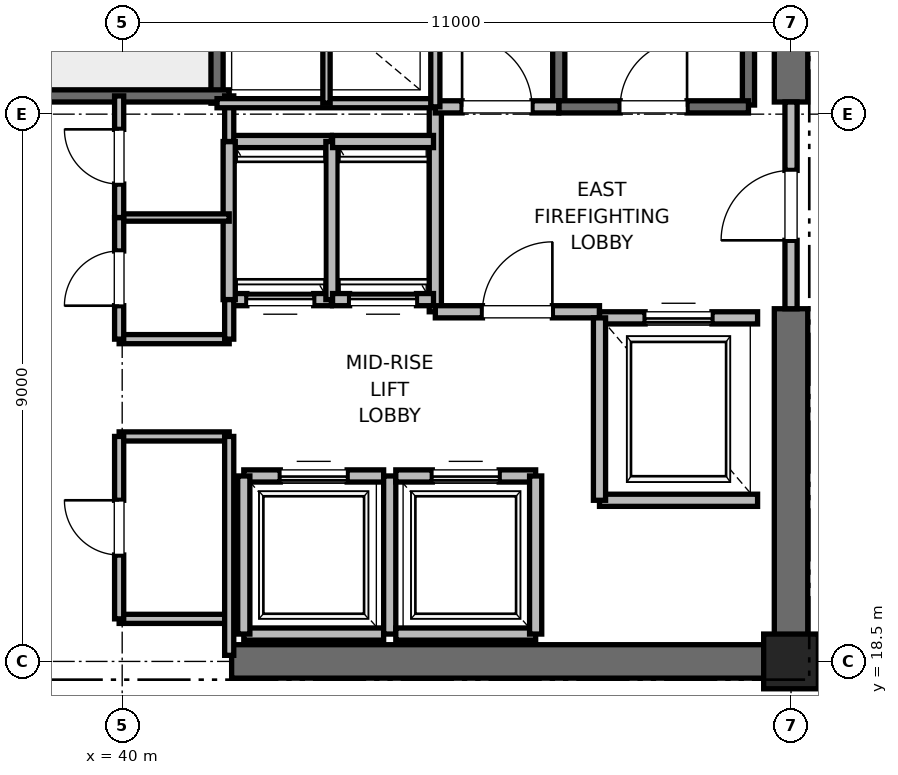
"""IFC4 building model, lengths in metres.
Left out: names, types, materials, properties, quantities, classifications, styles, units other than length and angle.
Written with IfcOpenShell. Run it as: python <this file> out.ifc"""

import sys

from ifc_helpers import new_model, si_unit, direction, frame, frame_2d, origin, origin_2d, place, context, subcontext, project, spatial, rectangle, extrude, element, fill, save


model = new_model("IFC4")
c1 = context("Model", 3, precision=1e-05, world=origin(), true_north=direction((0.0, 1.0)))
c2 = subcontext(c1, "Body", "Model", "MODEL_VIEW")
j1 = project(units=[si_unit("LENGTHUNIT", "METRE"), si_unit("PLANEANGLEUNIT", "RADIAN")], contexts=[c1])
p1 = place(None, origin())
s1 = spatial("IfcSite", under=j1, at=p1, CompositionType="ELEMENT")
p2 = place(p1, origin())
s2 = spatial("IfcBuilding", under=s1, at=p2, CompositionType="ELEMENT")
p3 = place(p2, frame((0.0, 0.0, 229.2)))
s3 = spatial("IfcBuildingStorey", under=s2, at=p3, CompositionType="ELEMENT", Elevation=229.2)
p4 = place(p3, frame((51.0, 18.5, 0.0), z_axis=(0.0, 0.0, 1.0), x_axis=(1.0, 0.0, 0.0)))
e1 = element("IfcColumn", 1, at=p4, inside=s3, PredefinedType="PILASTER", context=c2, shape_type="SweptSolid", body=[
    extrude(rectangle(XDim=0.9, YDim=0.9, at=origin_2d()), origin(), (0.0, 0.0, 1.0), 4.0),
])
p5 = place(p3, frame((41.8, 18.5, 0.0), z_axis=(0.0, 0.0, 1.0), x_axis=(1.0, 0.0, 0.0)))
e2 = element("IfcWall", 2, at=p5, inside=s3, PredefinedType="SHEAR", context=c2, shape_type="SweptSolid", body=[
    extrude(rectangle(XDim=9.2, YDim=0.55, at=frame_2d((4.6, 0.0))), origin(), (0.0, 0.0, 1.0), 3.7),
])
p6 = place(p3, frame((51.0, 18.5, 0.0), z_axis=(0.0, 0.0, 1.0), x_axis=(0.0, 1.0, 0.0)))
e3 = element("IfcWall", 3, at=p6, inside=s3, PredefinedType="SHEAR", context=c2, shape_type="SweptSolid", body=[
    extrude(rectangle(XDim=5.8, YDim=0.55, at=frame_2d((2.9, 0.0))), origin(), (0.0, 0.0, 1.0), 3.7),
])
p7 = place(p3, frame((51.0, 27.7, 0.0), z_axis=(0.0, 0.0, 1.0), x_axis=(0.0, 1.0, 0.0)))
e4 = element("IfcWall", 4, at=p7, inside=s3, PredefinedType="SHEAR", context=c2, shape_type="SweptSolid", body=[
    extrude(rectangle(XDim=8.8, YDim=0.55, at=frame_2d((4.4, 0.0))), origin(), (0.0, 0.0, 1.0), 3.7),
])
p8 = place(p3, frame((50.3, 27.65, 0.0), z_axis=(0.0, 0.0, 1.0), x_axis=(0.0, 1.0, 0.0)))
e5 = element("IfcWall", 5, at=p8, inside=s3, PredefinedType="SOLIDWALL", context=c2, shape_type="SweptSolid", body=[
    extrude(rectangle(XDim=8.15, YDim=0.2, at=frame_2d((4.075, 0.0))), origin(), (0.0, 0.0, 1.0), 3.7),
])
p9 = place(p3, frame((47.18, 27.62, 0.0), z_axis=(0.0, 0.0, 1.0), x_axis=(0.0, 1.0, 0.0)))
e6 = element("IfcWall", 6, at=p9, inside=s3, PredefinedType="SOLIDWALL", context=c2, shape_type="SweptSolid", body=[
    extrude(rectangle(XDim=8.18, YDim=0.2, at=frame_2d((4.09, 0.0))), origin(), (0.0, 0.0, 1.0), 3.7),
])
p10 = place(p3, frame((47.18, 27.62, 0.0), z_axis=(0.0, 0.0, 1.0), x_axis=(1.0, 0.0, 0.0)))
e7 = element("IfcWall", 7, at=p10, inside=s3, PredefinedType="SOLIDWALL", context=c2, shape_type="SweptSolid", body=[
    extrude(rectangle(XDim=3.12, YDim=0.2, at=frame_2d((1.56, 0.0))), origin(), (0.0, 0.0, 1.0), 3.7),
])
p11 = place(p10, frame((1.01, 0.0, 0.0)))
e8 = element("IfcOpeningElement", 8, at=p11, cuts=e7, PredefinedType="OPENING", context=c2, shape_type="SweptSolid", body=[
    extrude(rectangle(XDim=1.1, YDim=2.15, at=frame_2d((0.55, 1.075))), frame((0.0, 0.1, 0.0), z_axis=(0.0, -1.0, 0.0), x_axis=(1.0, 0.0, 0.0)), (0.0, 0.0, 1.0), 0.2),
])
p12 = place(p3, frame((41.56, 27.68, 0.0), z_axis=(0.0, 0.0, 1.0), x_axis=(0.0, 1.0, 0.0)))
e9 = element("IfcWall", 9, at=p12, inside=s3, PredefinedType="SOLIDWALL", context=c2, shape_type="SweptSolid", body=[
    extrude(rectangle(XDim=8.57, YDim=0.2, at=frame_2d((4.285, 0.0))), origin(), (0.0, 0.0, 1.0), 3.7),
])
p13 = place(p3, frame((38.44, 27.8, 0.0), z_axis=(0.0, 0.0, 1.0), x_axis=(1.0, 0.0, 0.0)))
e10 = element("IfcWall", 10, at=p13, inside=s3, PredefinedType="SOLIDWALL", context=c2, shape_type="SweptSolid", body=[
    extrude(rectangle(XDim=3.32, YDim=0.2, at=frame_2d((1.66, 0.0))), origin(), (0.0, 0.0, 1.0), 3.7),
])
p14 = place(p3, frame((45.15, 24.25, 0.0), z_axis=(0.0, 0.0, 1.0), x_axis=(0.0, 1.0, 0.0)))
e11 = element("IfcWall", 11, at=p14, inside=s3, PredefinedType="PARTITIONING", context=c2, shape_type="SweptSolid", body=[
    extrude(rectangle(XDim=3.37, YDim=0.2, at=frame_2d((1.685, 0.0))), origin(), (0.0, 0.0, 1.0), 3.7),
])
p15 = place(p3, frame((45.15, 24.25, 0.0), z_axis=(0.0, 0.0, 1.0), x_axis=(1.0, 0.0, 0.0)))
e12 = element("IfcWall", 12, at=p15, inside=s3, PredefinedType="PARTITIONING", context=c2, shape_type="SweptSolid", body=[
    extrude(rectangle(XDim=2.7, YDim=0.2, at=frame_2d((1.35, 0.0))), origin(), (0.0, 0.0, 1.0), 3.7),
])
p16 = place(p15, frame((0.775, 0.0, 0.0)))
e13 = element("IfcOpeningElement", 13, at=p16, cuts=e12, PredefinedType="OPENING", context=c2, shape_type="SweptSolid", body=[
    extrude(rectangle(XDim=1.15, YDim=2.2, at=frame_2d((0.575, 1.1))), frame((0.0, 0.1, 0.0), z_axis=(0.0, -1.0, 0.0), x_axis=(1.0, 0.0, 0.0)), (0.0, 0.0, 1.0), 0.2),
])
p17 = place(p3, frame((45.15, 27.62, 0.0), z_axis=(0.0, 0.0, 1.0), x_axis=(1.0, 0.0, 0.0)))
e14 = element("IfcWall", 14, at=p17, inside=s3, PredefinedType="PARTITIONING", context=c2, shape_type="SweptSolid", body=[
    extrude(rectangle(XDim=2.03, YDim=0.2, at=frame_2d((1.015, 0.0))), origin(), (0.0, 0.0, 1.0), 3.7),
])
p18 = place(p17, frame((0.44, 0.0, 0.0)))
e15 = element("IfcOpeningElement", 15, at=p18, cuts=e14, PredefinedType="OPENING", context=c2, shape_type="SweptSolid", body=[
    extrude(rectangle(XDim=1.15, YDim=2.2, at=frame_2d((0.575, 1.1))), frame((0.0, 0.1, 0.0), z_axis=(0.0, -1.0, 0.0), x_axis=(1.0, 0.0, 0.0)), (0.0, 0.0, 1.0), 0.2),
])
p19 = place(p3, frame((51.0, 24.3, 0.0), z_axis=(0.0, 0.0, 1.0), x_axis=(0.0, 1.0, 0.0)))
e16 = element("IfcWall", 16, at=p19, inside=s3, PredefinedType="PARTITIONING", context=c2, shape_type="SweptSolid", body=[
    extrude(rectangle(XDim=3.4, YDim=0.2, at=frame_2d((1.7, 0.0))), origin(), (0.0, 0.0, 1.0), 2.68),
])
p20 = place(p19, frame((1.125, 0.0, 0.0)))
e17 = element("IfcOpeningElement", 17, at=p20, cuts=e16, PredefinedType="OPENING", context=c2, shape_type="SweptSolid", body=[
    extrude(rectangle(XDim=1.15, YDim=2.2, at=frame_2d((0.575, 1.1))), frame((0.0, 0.1, 0.0), z_axis=(0.0, -1.0, 0.0), x_axis=(1.0, 0.0, 0.0)), (0.0, 0.0, 1.0), 0.2),
])
p21 = place(p3, frame((47.85, 21.15, 0.0), z_axis=(0.0, 0.0, 1.0), x_axis=(1.0, 0.0, 0.0)))
e18 = element("IfcWall", 18, at=p21, inside=s3, PredefinedType="SOLIDWALL", context=c2, shape_type="SweptSolid", body=[
    extrude(rectangle(XDim=2.6, YDim=0.2, at=frame_2d((1.3, 0.0))), origin(), (0.0, 0.0, 1.0), 3.7),
])
p22 = place(p3, frame((50.45, 24.15, 0.0), z_axis=(0.0, 0.0, 1.0), x_axis=(-1.0, 0.0, 0.0)))
e19 = element("IfcWall", 19, at=p22, inside=s3, PredefinedType="SOLIDWALL", context=c2, shape_type="SweptSolid", body=[
    extrude(rectangle(XDim=2.6, YDim=0.2, at=frame_2d((1.3, 0.0))), origin(), (0.0, 0.0, 1.0), 2.68),
])
p23 = place(p22, frame((0.75, 0.0, 0.0)))
e20 = element("IfcOpeningElement", 20, at=p23, cuts=e19, PredefinedType="OPENING", context=c2, shape_type="SweptSolid", body=[
    extrude(rectangle(XDim=1.1, YDim=2.2, at=frame_2d((0.55, 1.1))), frame((0.0, 0.1, 0.0), z_axis=(0.0, -1.0, 0.0), x_axis=(1.0, 0.0, 0.0)), (0.0, 0.0, 1.0), 0.2),
])
p24 = place(p3, frame((47.85, 24.15, 0.0), z_axis=(0.0, 0.0, 1.0), x_axis=(0.0, -1.0, 0.0)))
e21 = element("IfcWall", 21, at=p24, inside=s3, PredefinedType="SOLIDWALL", context=c2, shape_type="SweptSolid", body=[
    extrude(rectangle(XDim=3.0, YDim=0.2, at=frame_2d((1.5, 0.0))), origin(), (0.0, 0.0, 1.0), 3.7),
])
p25 = place(p3, frame((42.0, 18.95, 0.0), z_axis=(0.0, 0.0, 1.0), x_axis=(1.0, 0.0, 0.0)))
e22 = element("IfcWall", 22, at=p25, inside=s3, PredefinedType="SOLIDWALL", context=c2, shape_type="SweptSolid", body=[
    extrude(rectangle(XDim=2.3, YDim=0.2, at=frame_2d((1.15, 0.0))), origin(), (0.0, 0.0, 1.0), 2.68),
])
p26 = place(p3, frame((44.3, 21.55, 0.0), z_axis=(0.0, 0.0, 1.0), x_axis=(-1.0, 0.0, 0.0)))
e23 = element("IfcWall", 23, at=p26, inside=s3, PredefinedType="SOLIDWALL", context=c2, shape_type="SweptSolid", body=[
    extrude(rectangle(XDim=2.3, YDim=0.2, at=frame_2d((1.15, 0.0))), origin(), (0.0, 0.0, 1.0), 3.7),
])
p27 = place(p26, frame((0.6, 0.0, 0.0)))
e24 = element("IfcOpeningElement", 24, at=p27, cuts=e23, PredefinedType="OPENING", context=c2, shape_type="SweptSolid", body=[
    extrude(rectangle(XDim=1.1, YDim=2.2, at=frame_2d((0.55, 1.1))), frame((0.0, 0.1, 0.0), z_axis=(0.0, -1.0, 0.0), x_axis=(1.0, 0.0, 0.0)), (0.0, 0.0, 1.0), 0.2),
])
p28 = place(p3, frame((42.0, 21.55, 0.0), z_axis=(0.0, 0.0, 1.0), x_axis=(0.0, -1.0, 0.0)))
e25 = element("IfcWall", 25, at=p28, inside=s3, PredefinedType="SOLIDWALL", context=c2, shape_type="SweptSolid", body=[
    extrude(rectangle(XDim=2.6, YDim=0.2, at=frame_2d((1.3, 0.0))), origin(), (0.0, 0.0, 1.0), 2.68),
])
p29 = place(p3, frame((44.4, 18.95, 0.0), z_axis=(0.0, 0.0, 1.0), x_axis=(0.0, 1.0, 0.0)))
e26 = element("IfcWall", 26, at=p29, inside=s3, PredefinedType="SOLIDWALL", context=c2, shape_type="SweptSolid", body=[
    extrude(rectangle(XDim=2.6, YDim=0.2, at=frame_2d((1.3, 0.0))), origin(), (0.0, 0.0, 1.0), 3.7),
])
p30 = place(p3, frame((44.5, 18.95, 0.0), z_axis=(0.0, 0.0, 1.0), x_axis=(1.0, 0.0, 0.0)))
e27 = element("IfcWall", 27, at=p30, inside=s3, PredefinedType="SOLIDWALL", context=c2, shape_type="SweptSolid", body=[
    extrude(rectangle(XDim=2.3, YDim=0.2, at=frame_2d((1.15, 0.0))), origin(), (0.0, 0.0, 1.0), 3.7),
])
p31 = place(p3, frame((46.8, 21.55, 0.0), z_axis=(0.0, 0.0, 1.0), x_axis=(-1.0, 0.0, 0.0)))
e28 = element("IfcWall", 28, at=p31, inside=s3, PredefinedType="SOLIDWALL", context=c2, shape_type="SweptSolid", body=[
    extrude(rectangle(XDim=2.3, YDim=0.2, at=frame_2d((1.15, 0.0))), origin(), (0.0, 0.0, 1.0), 3.7),
])
p32 = place(p31, frame((0.6, 0.0, 0.0)))
e29 = element("IfcOpeningElement", 29, at=p32, cuts=e28, PredefinedType="OPENING", context=c2, shape_type="SweptSolid", body=[
    extrude(rectangle(XDim=1.1, YDim=2.2, at=frame_2d((0.55, 1.1))), frame((0.0, 0.1, 0.0), z_axis=(0.0, -1.0, 0.0), x_axis=(1.0, 0.0, 0.0)), (0.0, 0.0, 1.0), 0.2),
])
p33 = place(p3, frame((46.8, 18.95, 0.0), z_axis=(0.0, 0.0, 1.0), x_axis=(0.0, 1.0, 0.0)))
e30 = element("IfcWall", 30, at=p33, inside=s3, PredefinedType="SOLIDWALL", context=c2, shape_type="SweptSolid", body=[
    extrude(rectangle(XDim=2.6, YDim=0.2, at=frame_2d((1.3, 0.0))), origin(), (0.0, 0.0, 1.0), 3.7),
])
p34 = place(p3, frame((41.76, 24.45, 0.0), z_axis=(0.0, 0.0, 1.0), x_axis=(1.0, 0.0, 0.0)))
e31 = element("IfcWall", 31, at=p34, inside=s3, PredefinedType="SOLIDWALL", context=c2, shape_type="SweptSolid", body=[
    extrude(rectangle(XDim=1.68, YDim=0.2, at=frame_2d((0.84, 0.0))), origin(), (0.0, 0.0, 1.0), 3.7),
])
p35 = place(p34, frame((0.29, 0.0, 0.0)))
e32 = element("IfcOpeningElement", 32, at=p35, cuts=e31, PredefinedType="OPENING", context=c2, shape_type="SweptSolid", body=[
    extrude(rectangle(XDim=1.1, YDim=2.2, at=frame_2d((0.55, 1.1))), frame((0.0, 0.1, 0.0), z_axis=(0.0, -1.0, 0.0), x_axis=(1.0, 0.0, 0.0)), (0.0, 0.0, 1.0), 0.2),
])
p36 = place(p3, frame((43.44, 27.05, 0.0), z_axis=(0.0, 0.0, 1.0), x_axis=(-1.0, 0.0, 0.0)))
e33 = element("IfcWall", 33, at=p36, inside=s3, PredefinedType="SOLIDWALL", context=c2, shape_type="SweptSolid", body=[
    extrude(rectangle(XDim=1.68, YDim=0.2, at=frame_2d((0.84, 0.0))), origin(), (0.0, 0.0, 1.0), 3.7),
])
for number, where, z_axis, x_axis in (
    (34, (41.76, 27.05, 0.0), (0.0, 0.0, 1.0), (0.0, -1.0, 0.0)),
    (35, (43.45, 24.45, 0.0), (0.0, 0.0, 1.0), (0.0, 1.0, 0.0)),
):
    element("IfcWall", number, at=place(p3, frame(where, z_axis=z_axis, x_axis=x_axis)), inside=s3, PredefinedType="SOLIDWALL", context=c2, shape_type="SweptSolid", body=[
        extrude(rectangle(XDim=2.6, YDim=0.2, at=frame_2d((1.3, 0.0))), origin(), (0.0, 0.0, 1.0), 3.7),
    ])
p37 = place(p3, frame((43.46, 24.45, 0.0), z_axis=(0.0, 0.0, 1.0), x_axis=(1.0, 0.0, 0.0)))
e36 = element("IfcWall", 36, at=p37, inside=s3, PredefinedType="SOLIDWALL", context=c2, shape_type="SweptSolid", body=[
    extrude(rectangle(XDim=1.66, YDim=0.2, at=frame_2d((0.83, 0.0))), origin(), (0.0, 0.0, 1.0), 3.7),
])
p38 = place(p37, frame((0.28, 0.0, 0.0)))
e37 = element("IfcOpeningElement", 37, at=p38, cuts=e36, PredefinedType="OPENING", context=c2, shape_type="SweptSolid", body=[
    extrude(rectangle(XDim=1.1, YDim=2.2, at=frame_2d((0.55, 1.1))), frame((0.0, 0.1, 0.0), z_axis=(0.0, -1.0, 0.0), x_axis=(1.0, 0.0, 0.0)), (0.0, 0.0, 1.0), 0.2),
])
p39 = place(p3, frame((45.12, 27.05, 0.0), z_axis=(0.0, 0.0, 1.0), x_axis=(-1.0, 0.0, 0.0)))
e38 = element("IfcWall", 38, at=p39, inside=s3, PredefinedType="SOLIDWALL", context=c2, shape_type="SweptSolid", body=[
    extrude(rectangle(XDim=1.66, YDim=0.2, at=frame_2d((0.83, 0.0))), origin(), (0.0, 0.0, 1.0), 3.7),
])
for number, where, z_axis, x_axis in (
    (39, (39.95, 19.2, 0.0), (0.0, 0.0, 1.0), (1.0, 0.0, 0.0)),
    (40, (39.95, 22.2, 0.0), (0.0, 0.0, 1.0), (1.0, 0.0, 0.0)),
    (41, (39.95, 23.8, 0.0), (0.0, 0.0, 1.0), (1.0, 0.0, 0.0)),
):
    element("IfcWall", number, at=place(p3, frame(where, z_axis=z_axis, x_axis=x_axis)), inside=s3, PredefinedType="PARTITIONING", context=c2, shape_type="SweptSolid", body=[
        extrude(rectangle(XDim=1.81, YDim=0.15, at=frame_2d((0.905, 0.0))), origin(), (0.0, 0.0, 1.0), 2.85),
    ])
p40 = place(p3, frame((39.95, 25.8, 0.0), z_axis=(0.0, 0.0, 1.0), x_axis=(1.0, 0.0, 0.0)))
e42 = element("IfcWall", 42, at=p40, inside=s3, PredefinedType="PARTITIONING", context=c2, shape_type="SweptSolid", body=[
    extrude(rectangle(XDim=1.81, YDim=0.12, at=frame_2d((0.905, 0.0))), origin(), (0.0, 0.0, 1.0), 2.85),
])
p41 = place(p3, frame((41.76, 18.6, 0.0), z_axis=(0.0, 0.0, 1.0), x_axis=(0.0, 1.0, 0.0)))
e43 = element("IfcWall", 43, at=p41, inside=s3, PredefinedType="PARTITIONING", context=c2, shape_type="SweptSolid", body=[
    extrude(rectangle(XDim=3.6, YDim=0.15, at=frame_2d((1.8, 0.0))), origin(), (0.0, 0.0, 1.0), 2.68),
])
p42 = place(p3, frame((41.76, 23.8, 0.0), z_axis=(0.0, 0.0, 1.0), x_axis=(0.0, 1.0, 0.0)))
e44 = element("IfcWall", 44, at=p42, inside=s3, PredefinedType="PARTITIONING", context=c2, shape_type="SweptSolid", body=[
    extrude(rectangle(XDim=0.65, YDim=0.15, at=frame_2d((0.325, 0.0))), origin(), (0.0, 0.0, 1.0), 2.85),
])
p43 = place(p3, frame((41.76, 27.05, 0.0), z_axis=(0.0, 0.0, 1.0), x_axis=(0.0, 1.0, 0.0)))
e45 = element("IfcWall", 45, at=p43, inside=s3, PredefinedType="PARTITIONING", context=c2, shape_type="SweptSolid", body=[
    extrude(rectangle(XDim=0.75, YDim=0.15, at=frame_2d((0.375, 0.0))), origin(), (0.0, 0.0, 1.0), 2.85),
])
p44 = place(p3, frame((39.95, 19.2, 0.0), z_axis=(0.0, 0.0, 1.0), x_axis=(0.0, 1.0, 0.0)))
e46 = element("IfcWall", 46, at=p44, inside=s3, PredefinedType="PARTITIONING", context=c2, shape_type="SweptSolid", body=[
    extrude(rectangle(XDim=3.0, YDim=0.15, at=frame_2d((1.5, 0.0))), origin(), (0.0, 0.0, 1.0), 2.85),
])
p45 = place(p44, frame((1.05, 0.0, 0.0)))
e47 = element("IfcOpeningElement", 47, at=p45, cuts=e46, PredefinedType="OPENING", context=c2, shape_type="SweptSolid", body=[
    extrude(rectangle(XDim=0.9, YDim=2.1, at=frame_2d((0.45, 1.05))), frame((0.0, 0.075, 0.0), z_axis=(0.0, -1.0, 0.0), x_axis=(1.0, 0.0, 0.0)), (0.0, 0.0, 1.0), 0.15),
])
p46 = place(p3, frame((39.95, 23.8, 0.0), z_axis=(0.0, 0.0, 1.0), x_axis=(0.0, 1.0, 0.0)))
e48 = element("IfcWall", 48, at=p46, inside=s3, PredefinedType="PARTITIONING", context=c2, shape_type="SweptSolid", body=[
    extrude(rectangle(XDim=2.0, YDim=0.15, at=frame_2d((1.0, 0.0))), origin(), (0.0, 0.0, 1.0), 2.85),
])
p47 = place(p46, frame((0.55, 0.0, 0.0)))
e49 = element("IfcOpeningElement", 49, at=p47, cuts=e48, PredefinedType="OPENING", context=c2, shape_type="SweptSolid", body=[
    extrude(rectangle(XDim=0.9, YDim=2.1, at=frame_2d((0.45, 1.05))), frame((0.0, 0.075, 0.0), z_axis=(0.0, -1.0, 0.0), x_axis=(1.0, 0.0, 0.0)), (0.0, 0.0, 1.0), 0.15),
])
p48 = place(p3, frame((39.95, 25.8, 0.0), z_axis=(0.0, 0.0, 1.0), x_axis=(0.0, 1.0, 0.0)))
e50 = element("IfcWall", 50, at=p48, inside=s3, PredefinedType="PARTITIONING", context=c2, shape_type="SweptSolid", body=[
    extrude(rectangle(XDim=2.0, YDim=0.15, at=frame_2d((1.0, 0.0))), origin(), (0.0, 0.0, 1.0), 2.85),
])
p49 = place(p48, frame((0.55, 0.0, 0.0)))
e51 = element("IfcOpeningElement", 51, at=p49, cuts=e50, PredefinedType="OPENING", context=c2, shape_type="SweptSolid", body=[
    extrude(rectangle(XDim=0.9, YDim=2.1, at=frame_2d((0.45, 1.05))), frame((0.0, 0.075, 0.0), z_axis=(0.0, -1.0, 0.0), x_axis=(1.0, 0.0, 0.0)), (0.0, 0.0, 1.0), 0.15),
])
p50 = place(p3, frame((41.56, 27.68, 0.0), z_axis=(0.0, 0.0, 1.0), x_axis=(1.0, 0.0, 0.0)))
e52 = element("IfcWall", 52, at=p50, inside=s3, PredefinedType="PARTITIONING", context=c2, shape_type="SweptSolid", body=[
    extrude(rectangle(XDim=3.59, YDim=0.15, at=frame_2d((1.795, 0.0))), origin(), (0.0, 0.0, 1.0), 2.85),
])
p51 = place(p3, frame((45.15, 27.62, 0.0), z_axis=(0.0, 0.0, 1.0), x_axis=(0.0, 1.0, 0.0)))
e53 = element("IfcWall", 53, at=p51, inside=s3, PredefinedType="PARTITIONING", context=c2, shape_type="SweptSolid", body=[
    extrude(rectangle(XDim=3.1, YDim=0.15, at=frame_2d((1.55, 0.0))), origin(), (0.0, 0.0, 1.0), 2.85),
])
p52 = place(p3, frame((43.36, 27.68, 0.0), z_axis=(0.0, 0.0, 1.0), x_axis=(0.0, 1.0, 0.0)))
e54 = element("IfcWall", 54, at=p52, inside=s3, PredefinedType="PARTITIONING", context=c2, shape_type="SweptSolid", body=[
    extrude(rectangle(XDim=3.04, YDim=0.12, at=frame_2d((1.52, 0.0))), origin(), (0.0, 0.0, 1.0), 2.85),
])
p53 = place(p11, origin())
e55 = element("IfcDoor", 55, at=p53, inside=s3, OperationType="SINGLE_SWING_RIGHT", PredefinedType="DOOR", context=c2, shape_type="SweptSolid", body=[
    extrude(rectangle(XDim=1.1, YDim=2.15, at=frame_2d((0.55, 1.075))), frame((0.0, 0.025, 0.0), z_axis=(0.0, -1.0, 0.0), x_axis=(1.0, 0.0, 0.0)), (0.0, 0.0, 1.0), 0.05),
])
fill(e8, e55)
p54 = place(p16, origin())
e56 = element("IfcDoor", 56, at=p54, inside=s3, OperationType="SINGLE_SWING_RIGHT", PredefinedType="DOOR", context=c2, shape_type="SweptSolid", body=[
    extrude(rectangle(XDim=1.15, YDim=2.2, at=frame_2d((0.575, 1.1))), frame((0.0, 0.025, 0.0), z_axis=(0.0, -1.0, 0.0), x_axis=(1.0, 0.0, 0.0)), (0.0, 0.0, 1.0), 0.05),
])
fill(e13, e56)
p55 = place(p18, origin())
e57 = element("IfcDoor", 57, at=p55, inside=s3, OperationType="SINGLE_SWING_LEFT", PredefinedType="DOOR", context=c2, shape_type="SweptSolid", body=[
    extrude(rectangle(XDim=1.15, YDim=2.2, at=frame_2d((0.575, 1.1))), frame((0.0, 0.025, 0.0), z_axis=(0.0, -1.0, 0.0), x_axis=(1.0, 0.0, 0.0)), (0.0, 0.0, 1.0), 0.05),
])
fill(e15, e57)
p56 = place(p20, origin())
e58 = element("IfcDoor", 58, at=p56, inside=s3, OperationType="SINGLE_SWING_LEFT", PredefinedType="DOOR", context=c2, shape_type="SweptSolid", body=[
    extrude(rectangle(XDim=1.15, YDim=2.2, at=frame_2d((0.575, 1.1))), frame((0.0, 0.025, 0.0), z_axis=(0.0, -1.0, 0.0), x_axis=(1.0, 0.0, 0.0)), (0.0, 0.0, 1.0), 0.05),
])
fill(e17, e58)
p57 = place(p23, origin())
e59 = element("IfcDoor", 59, at=p57, inside=s3, OperationType="SLIDING_TO_RIGHT", PredefinedType="DOOR", context=c2, shape_type="SweptSolid", body=[
    extrude(rectangle(XDim=1.1, YDim=2.2, at=frame_2d((0.55, 1.1))), frame((0.0, 0.025, 0.0), z_axis=(0.0, -1.0, 0.0), x_axis=(1.0, 0.0, 0.0)), (0.0, 0.0, 1.0), 0.05),
])
fill(e20, e59)
p58 = place(p27, origin())
e60 = element("IfcDoor", 60, at=p58, inside=s3, OperationType="SLIDING_TO_RIGHT", PredefinedType="DOOR", context=c2, shape_type="SweptSolid", body=[
    extrude(rectangle(XDim=1.1, YDim=2.2, at=frame_2d((0.55, 1.1))), frame((0.0, 0.025, 0.0), z_axis=(0.0, -1.0, 0.0), x_axis=(1.0, 0.0, 0.0)), (0.0, 0.0, 1.0), 0.05),
])
fill(e24, e60)
p59 = place(p32, origin())
e61 = element("IfcDoor", 61, at=p59, inside=s3, OperationType="SLIDING_TO_RIGHT", PredefinedType="DOOR", context=c2, shape_type="SweptSolid", body=[
    extrude(rectangle(XDim=1.1, YDim=2.2, at=frame_2d((0.55, 1.1))), frame((0.0, 0.025, 0.0), z_axis=(0.0, -1.0, 0.0), x_axis=(1.0, 0.0, 0.0)), (0.0, 0.0, 1.0), 0.05),
])
fill(e29, e61)
p60 = place(p35, origin())
e62 = element("IfcDoor", 62, at=p60, inside=s3, OperationType="SLIDING_TO_RIGHT", PredefinedType="DOOR", context=c2, shape_type="SweptSolid", body=[
    extrude(rectangle(XDim=1.1, YDim=2.2, at=frame_2d((0.55, 1.1))), frame((0.0, 0.025, 0.0), z_axis=(0.0, -1.0, 0.0), x_axis=(1.0, 0.0, 0.0)), (0.0, 0.0, 1.0), 0.05),
])
fill(e32, e62)
p61 = place(p38, origin())
e63 = element("IfcDoor", 63, at=p61, inside=s3, OperationType="SLIDING_TO_RIGHT", PredefinedType="DOOR", context=c2, shape_type="SweptSolid", body=[
    extrude(rectangle(XDim=1.1, YDim=2.2, at=frame_2d((0.55, 1.1))), frame((0.0, 0.025, 0.0), z_axis=(0.0, -1.0, 0.0), x_axis=(1.0, 0.0, 0.0)), (0.0, 0.0, 1.0), 0.05),
])
fill(e37, e63)
p62 = place(p45, origin())
e64 = element("IfcDoor", 64, at=p62, inside=s3, OperationType="SINGLE_SWING_RIGHT", PredefinedType="DOOR", context=c2, shape_type="SweptSolid", body=[
    extrude(rectangle(XDim=0.9, YDim=2.1, at=frame_2d((0.45, 1.05))), frame((0.0, 0.025, 0.0), z_axis=(0.0, -1.0, 0.0), x_axis=(1.0, 0.0, 0.0)), (0.0, 0.0, 1.0), 0.05),
])
fill(e47, e64)
p63 = place(p47, origin())
e65 = element("IfcDoor", 65, at=p63, inside=s3, OperationType="SINGLE_SWING_LEFT", PredefinedType="DOOR", context=c2, shape_type="SweptSolid", body=[
    extrude(rectangle(XDim=0.9, YDim=2.1, at=frame_2d((0.45, 1.05))), frame((0.0, 0.025, 0.0), z_axis=(0.0, -1.0, 0.0), x_axis=(1.0, 0.0, 0.0)), (0.0, 0.0, 1.0), 0.05),
])
fill(e49, e65)
p64 = place(p49, origin())
e66 = element("IfcDoor", 66, at=p64, inside=s3, OperationType="SINGLE_SWING_RIGHT", PredefinedType="DOOR", context=c2, shape_type="SweptSolid", body=[
    extrude(rectangle(XDim=0.9, YDim=2.1, at=frame_2d((0.45, 1.05))), frame((0.0, 0.025, 0.0), z_axis=(0.0, -1.0, 0.0), x_axis=(1.0, 0.0, 0.0)), (0.0, 0.0, 1.0), 0.05),
])
fill(e51, e66)
save(model, sys.argv[1])
